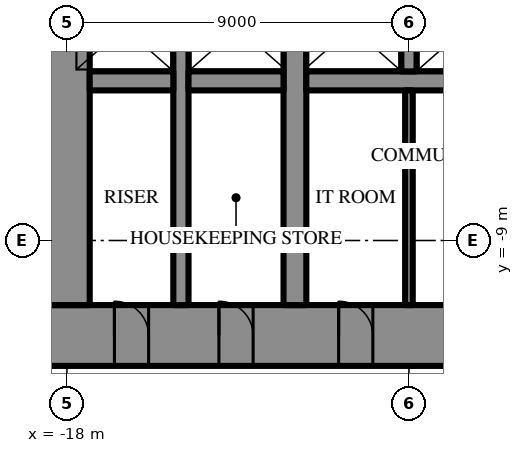
"""IFC4 building model, lengths in metres.
Left out: names, types, materials, properties, quantities, classifications, styles, units other than length and angle.
Written with IfcOpenShell. Run it as: python <this file> out.ifc"""

import sys

from ifc_helpers import new_model, si_unit, direction, frame, frame_2d, origin, place, context, subcontext, project, spatial, rectangle, extrude, element, fill, save


model = new_model("IFC4")
c1 = context("Model", 3, precision=1e-05, world=origin(), true_north=direction((0.0, 1.0)))
c2 = subcontext(c1, "Body", "Model", "MODEL_VIEW")
j1 = project(units=[si_unit("LENGTHUNIT", "METRE"), si_unit("PLANEANGLEUNIT", "RADIAN")], contexts=[c1])
p1 = place(None, origin())
s1 = spatial("IfcSite", under=j1, at=p1, CompositionType="ELEMENT")
p2 = place(p1, origin())
s2 = spatial("IfcBuilding", under=s1, at=p2, CompositionType="ELEMENT")
p3 = place(p2, frame((0.0, 0.0, 52.9)))
s3 = spatial("IfcBuildingStorey", under=s2, at=p3, CompositionType="ELEMENT", Elevation=52.9)
p4 = place(p3, frame((18.6, -11.5, 0.0), z_axis=(0.0, 0.0, 1.0), x_axis=(-1.0, 0.0, 0.0)))
e1 = element("IfcWall", 1, at=p4, inside=s3, PredefinedType="SHEAR", context=c2, shape_type="SweptSolid", body=[
    extrude(rectangle(XDim=37.2, YDim=1.6, at=frame_2d((18.6, 0.0))), origin(), (0.0, 0.0, 1.0), 4.2),
])
p5 = place(p4, frame((19.45, 0.0, 0.0)))
e2 = element("IfcOpeningElement", 2, at=p5, cuts=e1, PredefinedType="OPENING", context=c2, shape_type="SweptSolid", body=[
    extrude(rectangle(XDim=0.9, YDim=2.2, at=frame_2d((0.45, 1.1))), frame((0.0, 0.81, 0.0), z_axis=(0.0, -1.0, 0.0), x_axis=(1.0, 0.0, 0.0)), (0.0, 0.0, 1.0), 1.62),
])
p6 = place(p4, frame((22.45, 0.0, 0.0)))
e3 = element("IfcOpeningElement", 3, at=p6, cuts=e1, PredefinedType="OPENING", context=c2, shape_type="SweptSolid", body=[
    extrude(rectangle(XDim=0.9, YDim=2.2, at=frame_2d((0.45, 1.1))), frame((0.0, 0.81, 0.0), z_axis=(0.0, -1.0, 0.0), x_axis=(1.0, 0.0, 0.0)), (0.0, 0.0, 1.0), 1.62),
])
p7 = place(p4, frame((25.5, 0.0, 0.0)))
e4 = element("IfcOpeningElement", 4, at=p7, cuts=e1, PredefinedType="OPENING", context=c2, shape_type="SweptSolid", body=[
    extrude(rectangle(XDim=1.0, YDim=2.2, at=frame_2d((0.5, 1.1))), frame((0.0, 0.81, 0.0), z_axis=(0.0, -1.0, 0.0), x_axis=(1.0, 0.0, 0.0)), (0.0, 0.0, 1.0), 1.62),
])
p8 = place(p4, frame((1.85, 0.0, 0.0)))
e5 = element("IfcOpeningElement", 5, at=p8, cuts=e1, PredefinedType="OPENING", context=c2, shape_type="SweptSolid", body=[
    extrude(rectangle(XDim=0.9, YDim=2.2, at=frame_2d((0.45, 1.1))), frame((0.0, 0.81, 0.0), z_axis=(0.0, -1.0, 0.0), x_axis=(1.0, 0.0, 0.0)), (0.0, 0.0, 1.0), 1.62),
])
p9 = place(p4, frame((4.6, 0.0, 0.0)))
e6 = element("IfcOpeningElement", 6, at=p9, cuts=e1, PredefinedType="OPENING", context=c2, shape_type="SweptSolid", body=[
    extrude(rectangle(XDim=0.9, YDim=2.2, at=frame_2d((0.45, 1.1))), frame((0.0, 0.81, 0.0), z_axis=(0.0, -1.0, 0.0), x_axis=(1.0, 0.0, 0.0)), (0.0, 0.0, 1.0), 1.62),
])
p10 = place(p4, frame((7.75, 0.0, 0.0)))
e7 = element("IfcOpeningElement", 7, at=p10, cuts=e1, PredefinedType="OPENING", context=c2, shape_type="SweptSolid", body=[
    extrude(rectangle(XDim=0.9, YDim=2.2, at=frame_2d((0.45, 1.1))), frame((0.0, 0.81, 0.0), z_axis=(0.0, -1.0, 0.0), x_axis=(1.0, 0.0, 0.0)), (0.0, 0.0, 1.0), 1.62),
])
p11 = place(p4, frame((28.55, 0.0, 0.0)))
e8 = element("IfcOpeningElement", 8, at=p11, cuts=e1, PredefinedType="OPENING", context=c2, shape_type="SweptSolid", body=[
    extrude(rectangle(XDim=0.9, YDim=2.2, at=frame_2d((0.45, 1.1))), frame((0.0, 0.81, 0.0), z_axis=(0.0, -1.0, 0.0), x_axis=(1.0, 0.0, 0.0)), (0.0, 0.0, 1.0), 1.62),
])
p12 = place(p4, frame((31.7, 0.0, 0.0)))
e9 = element("IfcOpeningElement", 9, at=p12, cuts=e1, PredefinedType="OPENING", context=c2, shape_type="SweptSolid", body=[
    extrude(rectangle(XDim=0.9, YDim=2.2, at=frame_2d((0.45, 1.1))), frame((0.0, 0.81, 0.0), z_axis=(0.0, -1.0, 0.0), x_axis=(1.0, 0.0, 0.0)), (0.0, 0.0, 1.0), 1.62),
])
p13 = place(p4, frame((34.45, 0.0, 0.0)))
e10 = element("IfcOpeningElement", 10, at=p13, cuts=e1, PredefinedType="OPENING", context=c2, shape_type="SweptSolid", body=[
    extrude(rectangle(XDim=0.9, YDim=2.2, at=frame_2d((0.45, 1.1))), frame((0.0, 0.81, 0.0), z_axis=(0.0, -1.0, 0.0), x_axis=(1.0, 0.0, 0.0)), (0.0, 0.0, 1.0), 1.62),
])
p14 = place(p3, frame((-18.0, 10.7, 0.0), z_axis=(0.0, 0.0, 1.0), x_axis=(0.0, -1.0, 0.0)))
e11 = element("IfcWall", 11, at=p14, inside=s3, PredefinedType="SHEAR", context=c2, shape_type="SweptSolid", body=[
    extrude(rectangle(XDim=21.4, YDim=1.2, at=frame_2d((10.7, 0.0))), origin(), (0.0, 0.0, 1.0), 4.2),
])
p15 = place(p14, frame((9.8, 0.0, 0.0)))
e12 = element("IfcOpeningElement", 12, at=p15, cuts=e11, PredefinedType="OPENING", context=c2, shape_type="SweptSolid", body=[
    extrude(rectangle(XDim=1.8, YDim=2.4, at=frame_2d((0.9, 1.2))), frame((0.0, 0.61, 0.0), z_axis=(0.0, -1.0, 0.0), x_axis=(1.0, 0.0, 0.0)), (0.0, 0.0, 1.0), 1.22),
])
p16 = place(p3, frame((-12.0, -10.7, 0.0), z_axis=(0.0, 0.0, 1.0), x_axis=(0.0, 1.0, 0.0)))
e13 = element("IfcWall", 13, at=p16, inside=s3, PredefinedType="SHEAR", context=c2, shape_type="SweptSolid", body=[
    extrude(rectangle(XDim=21.4, YDim=0.6, at=frame_2d((10.7, 0.0))), origin(), (0.0, 0.0, 1.0), 4.2),
])
p17 = place(p16, frame((9.8, 0.0, 0.0)))
e14 = element("IfcOpeningElement", 14, at=p17, cuts=e13, PredefinedType="OPENING", context=c2, shape_type="SweptSolid", body=[
    extrude(rectangle(XDim=1.8, YDim=2.4, at=frame_2d((0.9, 1.2))), frame((0.0, 0.31, 0.0), z_axis=(0.0, -1.0, 0.0), x_axis=(1.0, 0.0, 0.0)), (0.0, 0.0, 1.0), 0.62),
])
p18 = place(p3, frame((-15.0, -10.7, 0.0), z_axis=(0.0, 0.0, 1.0), x_axis=(0.0, 1.0, 0.0)))
e15 = element("IfcWall", 15, at=p18, inside=s3, PredefinedType="SHEAR", context=c2, shape_type="SweptSolid", body=[
    extrude(rectangle(XDim=21.4, YDim=0.4, at=frame_2d((10.7, 0.0))), origin(), (0.0, 0.0, 1.0), 4.2),
])
p19 = place(p18, frame((9.8, 0.0, 0.0)))
e16 = element("IfcOpeningElement", 16, at=p19, cuts=e15, PredefinedType="OPENING", context=c2, shape_type="SweptSolid", body=[
    extrude(rectangle(XDim=1.8, YDim=2.4, at=frame_2d((0.9, 1.2))), frame((0.0, 0.21, 0.0), z_axis=(0.0, -1.0, 0.0), x_axis=(1.0, 0.0, 0.0)), (0.0, 0.0, 1.0), 0.42),
])
p20 = place(p3, frame((11.7, -4.8, 0.0), z_axis=(0.0, 0.0, 1.0), x_axis=(-1.0, 0.0, 0.0)))
e17 = element("IfcWall", 17, at=p20, inside=s3, PredefinedType="SHEAR", context=c2, shape_type="SweptSolid", body=[
    extrude(rectangle(XDim=23.4, YDim=0.5, at=frame_2d((11.7, 0.0))), origin(), (0.0, 0.0, 1.0), 4.2),
])
p21 = place(p20, frame((6.6, 0.0, 0.0)))
e18 = element("IfcOpeningElement", 18, at=p21, cuts=e17, PredefinedType="OPENING", context=c2, shape_type="SweptSolid", body=[
    extrude(rectangle(XDim=1.2, YDim=2.2, at=frame_2d((0.6, 1.1))), frame((0.0, 0.26, 0.0), z_axis=(0.0, -1.0, 0.0), x_axis=(1.0, 0.0, 0.0)), (0.0, 0.0, 1.0), 0.52),
])
p22 = place(p20, frame((3.6, 0.0, 0.0)))
e19 = element("IfcOpeningElement", 19, at=p22, cuts=e17, PredefinedType="OPENING", context=c2, shape_type="SweptSolid", body=[
    extrude(rectangle(XDim=1.2, YDim=2.2, at=frame_2d((0.6, 1.1))), frame((0.0, 0.26, 0.0), z_axis=(0.0, -1.0, 0.0), x_axis=(1.0, 0.0, 0.0)), (0.0, 0.0, 1.0), 0.52),
])
p23 = place(p3, frame((-12.3, -4.8, 0.0), z_axis=(0.0, 0.0, 1.0), x_axis=(-1.0, 0.0, 0.0)))
e20 = element("IfcWall", 20, at=p23, inside=s3, PredefinedType="SHEAR", context=c2, shape_type="SweptSolid", body=[
    extrude(rectangle(XDim=2.5, YDim=0.5, at=frame_2d((1.25, 0.0))), origin(), (0.0, 0.0, 1.0), 4.2),
])
p24 = place(p3, frame((-15.2, -4.8, 0.0), z_axis=(0.0, 0.0, 1.0), x_axis=(-1.0, 0.0, 0.0)))
e21 = element("IfcWall", 21, at=p24, inside=s3, PredefinedType="SHEAR", context=c2, shape_type="SweptSolid", body=[
    extrude(rectangle(XDim=2.2, YDim=0.5, at=frame_2d((1.1, 0.0))), origin(), (0.0, 0.0, 1.0), 4.2),
])
p25 = place(p3, frame((-9.0, -2.25, 0.0), z_axis=(0.0, 0.0, 1.0), x_axis=(0.0, -1.0, 0.0)))
e22 = element("IfcWall", 22, at=p25, inside=s3, PredefinedType="SHEAR", context=c2, shape_type="SweptSolid", body=[
    extrude(rectangle(XDim=2.3, YDim=0.4, at=frame_2d((1.15, 0.0))), origin(), (0.0, 0.0, 1.0), 4.2),
])
p26 = place(p3, frame((-9.0, -5.05, 0.0), z_axis=(0.0, 0.0, 1.0), x_axis=(0.0, -1.0, 0.0)))
e23 = element("IfcWall", 23, at=p26, inside=s3, PredefinedType="PARTITIONING", context=c2, shape_type="SweptSolid", body=[
    extrude(rectangle(XDim=5.65, YDim=0.2, at=frame_2d((2.825, 0.0))), origin(), (0.0, 0.0, 1.0), 4.0),
])
p27 = place(p11, frame((0.9, 0.0, 0.0), z_axis=(0.0, 0.0, 1.0), x_axis=(-1.0, 0.0, 0.0)))
e24 = element("IfcDoor", 24, at=p27, inside=s3, OperationType="SINGLE_SWING_RIGHT", PredefinedType="DOOR", context=c2, shape_type="SweptSolid", body=[
    extrude(rectangle(XDim=0.9, YDim=2.2, at=frame_2d((0.45, 1.1))), frame((0.0, 0.025, 0.0), z_axis=(0.0, -1.0, 0.0), x_axis=(1.0, 0.0, 0.0)), (0.0, 0.0, 1.0), 0.05),
])
fill(e8, e24)
p28 = place(p12, frame((0.9, 0.0, 0.0), z_axis=(0.0, 0.0, 1.0), x_axis=(-1.0, 0.0, 0.0)))
e25 = element("IfcDoor", 25, at=p28, inside=s3, OperationType="SINGLE_SWING_RIGHT", PredefinedType="DOOR", context=c2, shape_type="SweptSolid", body=[
    extrude(rectangle(XDim=0.9, YDim=2.2, at=frame_2d((0.45, 1.1))), frame((0.0, 0.025, 0.0), z_axis=(0.0, -1.0, 0.0), x_axis=(1.0, 0.0, 0.0)), (0.0, 0.0, 1.0), 0.05),
])
fill(e9, e25)
p29 = place(p13, frame((0.9, 0.0, 0.0), z_axis=(0.0, 0.0, 1.0), x_axis=(-1.0, 0.0, 0.0)))
e26 = element("IfcDoor", 26, at=p29, inside=s3, OperationType="SINGLE_SWING_RIGHT", PredefinedType="DOOR", context=c2, shape_type="SweptSolid", body=[
    extrude(rectangle(XDim=0.9, YDim=2.2, at=frame_2d((0.45, 1.1))), frame((0.0, 0.025, 0.0), z_axis=(0.0, -1.0, 0.0), x_axis=(1.0, 0.0, 0.0)), (0.0, 0.0, 1.0), 0.05),
])
fill(e10, e26)
save(model, sys.argv[1])
